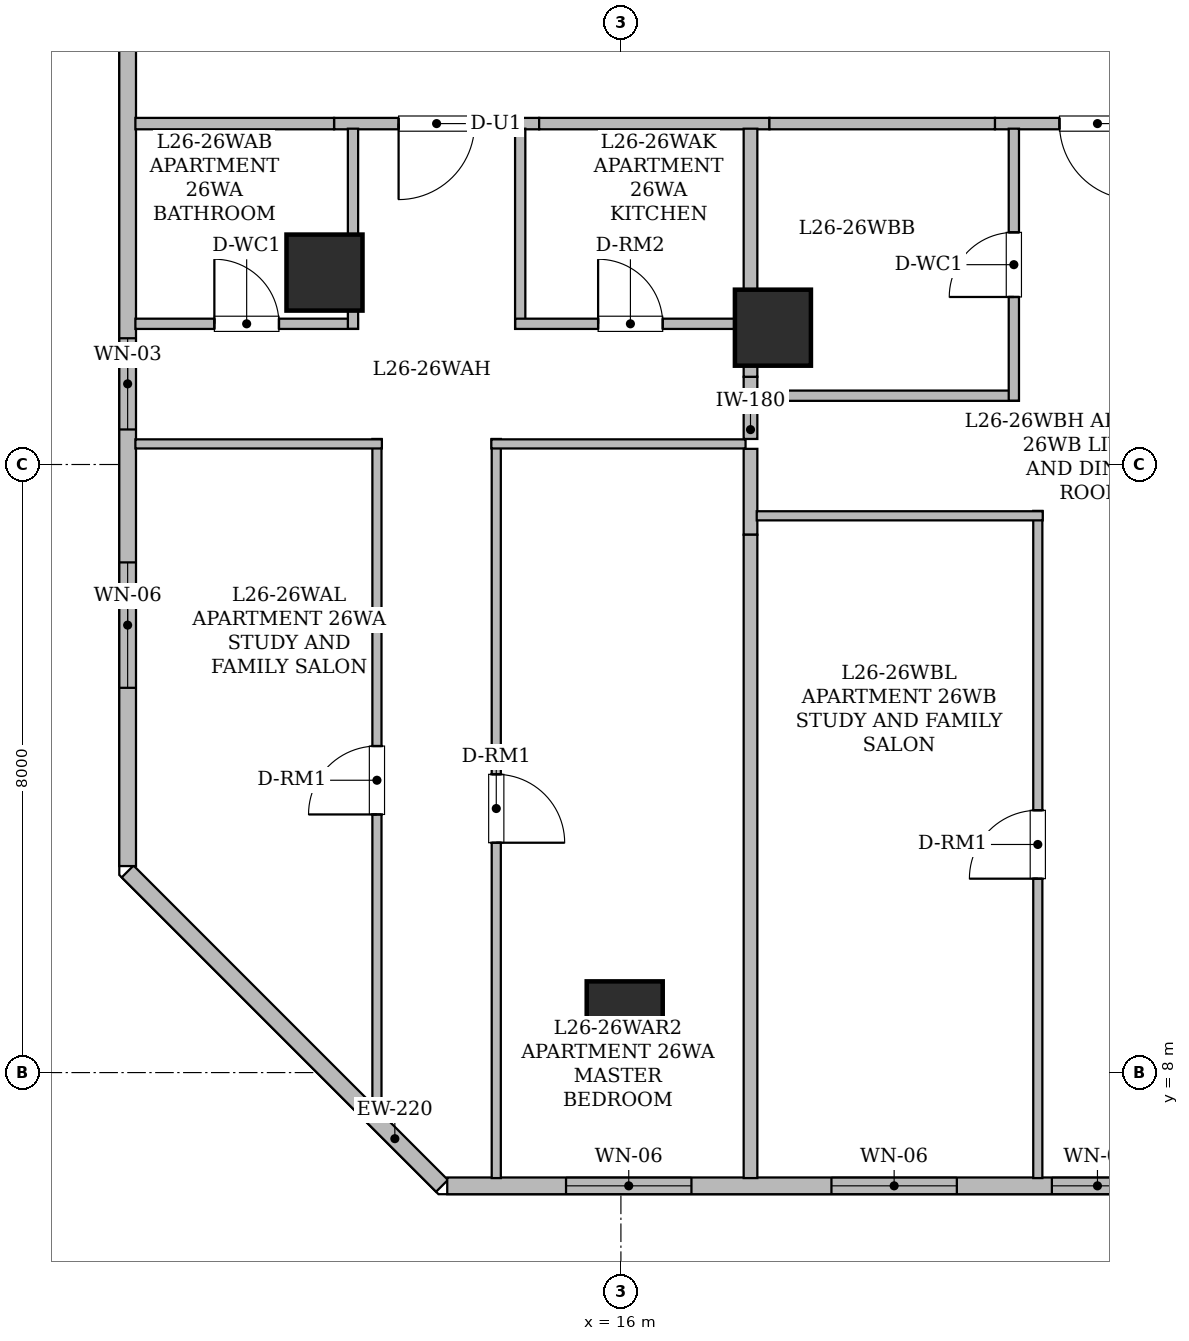
"""IFC4 building model, lengths in metres.
Left out: names, types, materials, properties, quantities, classifications, styles, units other than length and angle.
Written with IfcOpenShell. Run it as: python <this file> out.ifc"""

import sys

from ifc_helpers import new_model, si_unit, direction, frame, frame_2d, origin, origin_2d, place, context, subcontext, project, spatial, rectangle, hollow_rectangle, extrude, element, fill, save


model = new_model("IFC4")
c1 = context("Model", 3, precision=1e-05, world=origin(), true_north=direction((0.0, 1.0)))
c2 = subcontext(c1, "Body", "Model", "MODEL_VIEW")
j1 = project(units=[si_unit("LENGTHUNIT", "METRE"), si_unit("PLANEANGLEUNIT", "RADIAN")], contexts=[c1])
p1 = place(None, origin())
s1 = spatial("IfcSite", under=j1, at=p1, CompositionType="ELEMENT")
p2 = place(p1, origin())
s2 = spatial("IfcBuilding", under=s1, at=p2, CompositionType="ELEMENT")
p3 = place(p2, frame((0.0, 0.0, 105.55)))
s3 = spatial("IfcBuildingStorey", under=s2, at=p3, CompositionType="ELEMENT", Elevation=105.55)
for number, where, z_axis, x_axis in (
    (1, (16.05, 8.7, 0.0), (0.0, 0.0, 1.0), (1.0, 0.0, 0.0)),
    (2, (12.1, 18.525, 0.0), (0.0, 0.0, 1.0), (1.0, 0.0, 0.0)),
    (3, (18.0, 17.8, 0.0), (0.0, 0.0, 1.0), (1.0, 0.0, 0.0)),
):
    element("IfcColumn", number, at=place(p3, frame(where, z_axis=z_axis, x_axis=x_axis)), inside=s3, PredefinedType="COLUMN", context=c2, shape_type="SweptSolid", body=[
        extrude(hollow_rectangle(XDim=1.0, YDim=1.0, WallThickness=0.05, at=origin_2d()), origin(), (0.0, 0.0, 1.0), 3.65),
    ])
p4 = place(p3, frame((13.646, 6.51, 0.0), z_axis=(0.0, 0.0, 1.0), x_axis=(-0.707106781187, 0.707106781187, 0.0)))
e4 = element("IfcWall", 4, at=p4, inside=s3, PredefinedType="STANDARD", context=c2, shape_type="SweptSolid", body=[
    extrude(rectangle(XDim=5.849, YDim=0.22, at=frame_2d((2.925, 0.0))), origin(), (0.0, 0.0, 1.0), 3.43),
])
p5 = place(p3, frame((9.51, 10.717, 0.0), z_axis=(0.0, 0.0, 1.0), x_axis=(0.0, 1.0, 0.0)))
e5 = element("IfcWall", 5, at=p5, inside=s3, PredefinedType="STANDARD", context=c2, shape_type="SweptSolid", body=[
    extrude(rectangle(XDim=14.046, YDim=0.22, at=frame_2d((7.023, 0.0))), origin(), (0.0, 0.0, 1.0), 3.43),
])
p6 = place(p5, frame((5.744, 0.0, 0.8)))
e6 = element("IfcOpeningElement", 6, at=p6, cuts=e5, PredefinedType="OPENING", context=c2, shape_type="SweptSolid", body=[
    extrude(rectangle(XDim=1.2, YDim=1.5, at=frame_2d((0.6, 0.75))), frame((0.0, 0.12, 0.0), z_axis=(0.0, -1.0, 0.0), x_axis=(1.0, 0.0, 0.0)), (0.0, 0.0, 1.0), 0.24),
])
p7 = place(p5, frame((2.345, 0.0, 0.85)))
e7 = element("IfcOpeningElement", 7, at=p7, cuts=e5, PredefinedType="OPENING", context=c2, shape_type="SweptSolid", body=[
    extrude(rectangle(XDim=1.65, YDim=1.55, at=frame_2d((0.825, 0.775))), frame((0.0, 0.12, 0.0), z_axis=(0.0, -1.0, 0.0), x_axis=(1.0, 0.0, 0.0)), (0.0, 0.0, 1.0), 0.24),
])
p8 = place(p3, frame((52.283, 6.51, 0.0), z_axis=(0.0, 0.0, 1.0), x_axis=(-1.0, 0.0, 0.0)))
e8 = element("IfcWall", 8, at=p8, inside=s3, PredefinedType="STANDARD", context=c2, shape_type="SweptSolid", body=[
    extrude(rectangle(XDim=38.568, YDim=0.22, at=frame_2d((19.284, 0.0))), origin(), (0.0, 0.0, 1.0), 3.43),
])
p9 = place(p8, frame((21.108, 0.0, 0.85)))
e9 = element("IfcOpeningElement", 9, at=p9, cuts=e8, PredefinedType="OPENING", context=c2, shape_type="SweptSolid", body=[
    extrude(rectangle(XDim=1.65, YDim=1.55, at=frame_2d((0.825, 0.775))), frame((0.0, 0.12, 0.0), z_axis=(0.0, -1.0, 0.0), x_axis=(1.0, 0.0, 0.0)), (0.0, 0.0, 1.0), 0.24),
])
p10 = place(p8, frame((35.355, 0.0, 0.85)))
e10 = element("IfcOpeningElement", 10, at=p10, cuts=e8, PredefinedType="OPENING", context=c2, shape_type="SweptSolid", body=[
    extrude(rectangle(XDim=1.65, YDim=1.55, at=frame_2d((0.825, 0.775))), frame((0.0, 0.12, 0.0), z_axis=(0.0, -1.0, 0.0), x_axis=(1.0, 0.0, 0.0)), (0.0, 0.0, 1.0), 0.24),
])
p11 = place(p8, frame((29.413, 0.0, 0.8)))
e11 = element("IfcOpeningElement", 11, at=p11, cuts=e8, PredefinedType="OPENING", context=c2, shape_type="SweptSolid", body=[
    extrude(rectangle(XDim=1.2, YDim=1.5, at=frame_2d((0.6, 0.75))), frame((0.0, 0.12, 0.0), z_axis=(0.0, -1.0, 0.0), x_axis=(1.0, 0.0, 0.0)), (0.0, 0.0, 1.0), 0.24),
])
p12 = place(p8, frame((31.863, 0.0, 0.85)))
e12 = element("IfcOpeningElement", 12, at=p12, cuts=e8, PredefinedType="OPENING", context=c2, shape_type="SweptSolid", body=[
    extrude(rectangle(XDim=1.65, YDim=1.55, at=frame_2d((0.825, 0.775))), frame((0.0, 0.12, 0.0), z_axis=(0.0, -1.0, 0.0), x_axis=(1.0, 0.0, 0.0)), (0.0, 0.0, 1.0), 0.24),
])
p13 = place(p8, frame((26.513, 0.0, 0.85)))
e13 = element("IfcOpeningElement", 13, at=p13, cuts=e8, PredefinedType="OPENING", context=c2, shape_type="SweptSolid", body=[
    extrude(rectangle(XDim=1.65, YDim=1.55, at=frame_2d((0.825, 0.775))), frame((0.0, 0.12, 0.0), z_axis=(0.0, -1.0, 0.0), x_axis=(1.0, 0.0, 0.0)), (0.0, 0.0, 1.0), 0.24),
])
p14 = place(p8, frame((13.843, 0.0, 0.85)))
e14 = element("IfcOpeningElement", 14, at=p14, cuts=e8, PredefinedType="OPENING", context=c2, shape_type="SweptSolid", body=[
    extrude(rectangle(XDim=1.65, YDim=1.55, at=frame_2d((0.825, 0.775))), frame((0.0, 0.12, 0.0), z_axis=(0.0, -1.0, 0.0), x_axis=(1.0, 0.0, 0.0)), (0.0, 0.0, 1.0), 0.24),
])
p15 = place(p8, frame((1.479, 0.0, 0.85)))
e15 = element("IfcOpeningElement", 15, at=p15, cuts=e8, PredefinedType="OPENING", context=c2, shape_type="SweptSolid", body=[
    extrude(rectangle(XDim=1.65, YDim=1.55, at=frame_2d((0.825, 0.775))), frame((0.0, 0.12, 0.0), z_axis=(0.0, -1.0, 0.0), x_axis=(1.0, 0.0, 0.0)), (0.0, 0.0, 1.0), 0.24),
])
p16 = place(p3, frame((14.924, 20.485, 0.0), z_axis=(0.0, 0.0, 1.0), x_axis=(-1.0, 0.0, 0.0)))
e16 = element("IfcWall", 16, at=p16, inside=s3, PredefinedType="STANDARD", context=c2, shape_type="SweptSolid", body=[
    extrude(rectangle(XDim=2.698, YDim=0.15, at=frame_2d((1.349, 0.0))), origin(), (0.0, 0.0, 1.0), 3.43),
])
p17 = place(p16, frame((0.849, 0.0, 0.0)))
e17 = element("IfcOpeningElement", 17, at=p17, cuts=e16, PredefinedType="OPENING", context=c2, shape_type="SweptSolid", body=[
    extrude(rectangle(XDim=1.0, YDim=2.15, at=frame_2d((0.5, 1.075))), frame((0.0, 0.085, 0.0), z_axis=(0.0, -1.0, 0.0), x_axis=(1.0, 0.0, 0.0)), (0.0, 0.0, 1.0), 0.17),
])
p18 = place(p3, frame((12.226, 20.485, 0.0), z_axis=(0.0, 0.0, 1.0), x_axis=(-1.0, 0.0, 0.0)))
e18 = element("IfcWall", 18, at=p18, inside=s3, PredefinedType="STANDARD", context=c2, shape_type="SweptSolid", body=[
    extrude(rectangle(XDim=2.614, YDim=0.15, at=frame_2d((1.307, 0.0))), origin(), (0.0, 0.0, 1.0), 2.876),
])
p19 = place(p3, frame((17.954, 20.485, 0.0), z_axis=(0.0, 0.0, 1.0), x_axis=(-1.0, 0.0, 0.0)))
e19 = element("IfcWall", 19, at=p19, inside=s3, PredefinedType="STANDARD", context=c2, shape_type="SweptSolid", body=[
    extrude(rectangle(XDim=3.03, YDim=0.15, at=frame_2d((1.515, 0.0))), origin(), (0.0, 0.0, 1.0), 2.647),
])
p20 = place(p3, frame((23.619, 20.485, 0.0), z_axis=(0.0, 0.0, 1.0), x_axis=(-1.0, 0.0, 0.0)))
e20 = element("IfcWall", 20, at=p20, inside=s3, PredefinedType="STANDARD", context=c2, shape_type="SweptSolid", body=[
    extrude(rectangle(XDim=2.698, YDim=0.15, at=frame_2d((1.349, 0.0))), origin(), (0.0, 0.0, 1.0), 3.43),
])
p21 = place(p20, frame((0.849, 0.0, 0.0)))
e21 = element("IfcOpeningElement", 21, at=p21, cuts=e20, PredefinedType="OPENING", context=c2, shape_type="SweptSolid", body=[
    extrude(rectangle(XDim=1.0, YDim=2.15, at=frame_2d((0.5, 1.075))), frame((0.0, 0.085, 0.0), z_axis=(0.0, -1.0, 0.0), x_axis=(1.0, 0.0, 0.0)), (0.0, 0.0, 1.0), 0.17),
])
p22 = place(p3, frame((20.921, 20.485, 0.0), z_axis=(0.0, 0.0, 1.0), x_axis=(-1.0, 0.0, 0.0)))
e22 = element("IfcWall", 22, at=p22, inside=s3, PredefinedType="STANDARD", context=c2, shape_type="SweptSolid", body=[
    extrude(rectangle(XDim=2.967, YDim=0.15, at=frame_2d((1.483, 0.0))), origin(), (0.0, 0.0, 1.0), 2.647),
])
p23 = place(p3, frame((9.612, 17.851, 0.0), z_axis=(0.0, 0.0, 1.0), x_axis=(1.0, 0.0, 0.0)))
e23 = element("IfcWall", 23, at=p23, inside=s3, PredefinedType="PARTITIONING", context=c2, shape_type="SweptSolid", body=[
    extrude(rectangle(XDim=2.928, YDim=0.135, at=frame_2d((1.464, 0.0))), origin(), (0.0, 0.0, 1.0), 2.876),
])
p24 = place(p23, frame((1.039, 0.0, 0.0)))
e24 = element("IfcOpeningElement", 24, at=p24, cuts=e23, PredefinedType="OPENING", context=c2, shape_type="SweptSolid", body=[
    extrude(rectangle(XDim=0.85, YDim=2.1, at=frame_2d((0.425, 1.05))), frame((0.0, 0.077, 0.0), z_axis=(0.0, -1.0, 0.0), x_axis=(1.0, 0.0, 0.0)), (0.0, 0.0, 1.0), 0.155),
])
for number, where, z_axis, x_axis in (
    (25, (12.475, 17.786, 0.0), (0.0, 0.0, 1.0), (0.0, 1.0, 0.0)),
    (26, (14.675, 20.418, 0.0), (0.0, 0.0, 1.0), (0.0, -1.0, 0.0)),
):
    element("IfcWall", number, at=place(p3, frame(where, z_axis=z_axis, x_axis=x_axis)), inside=s3, PredefinedType="PARTITIONING", context=c2, shape_type="SweptSolid", body=[
        extrude(rectangle(XDim=2.632, YDim=0.135, at=frame_2d((1.316, 0.0))), origin(), (0.0, 0.0, 1.0), 2.647),
    ])
p25 = place(p3, frame((14.61, 17.851, 0.0), z_axis=(0.0, 0.0, 1.0), x_axis=(1.0, 0.0, 0.0)))
e27 = element("IfcWall", 27, at=p25, inside=s3, PredefinedType="PARTITIONING", context=c2, shape_type="SweptSolid", body=[
    extrude(rectangle(XDim=3.03, YDim=0.135, at=frame_2d((1.515, 0.0))), origin(), (0.0, 0.0, 1.0), 2.647),
])
p26 = place(p25, frame((1.09, 0.0, 0.0)))
e28 = element("IfcOpeningElement", 28, at=p26, cuts=e27, PredefinedType="OPENING", context=c2, shape_type="SweptSolid", body=[
    extrude(rectangle(XDim=0.85, YDim=2.1, at=frame_2d((0.425, 1.05))), frame((0.0, 0.077, 0.0), z_axis=(0.0, -1.0, 0.0), x_axis=(1.0, 0.0, 0.0)), (0.0, 0.0, 1.0), 0.155),
])
p27 = place(p3, frame((12.79, 7.357, 0.0), z_axis=(0.0, 0.0, 1.0), x_axis=(0.0, 1.0, 0.0)))
e29 = element("IfcWall", 29, at=p27, inside=s3, PredefinedType="PARTITIONING", context=c2, shape_type="SweptSolid", body=[
    extrude(rectangle(XDim=8.979, YDim=0.12, at=frame_2d((4.49, 0.0))), origin(), (0.0, 0.0, 1.0), 2.876),
])
p28 = place(p27, frame((4.039, 0.0, 0.0)))
e30 = element("IfcOpeningElement", 30, at=p28, cuts=e29, PredefinedType="OPENING", context=c2, shape_type="SweptSolid", body=[
    extrude(rectangle(XDim=0.9, YDim=2.1, at=frame_2d((0.45, 1.05))), frame((0.0, 0.07, 0.0), z_axis=(0.0, -1.0, 0.0), x_axis=(1.0, 0.0, 0.0)), (0.0, 0.0, 1.0), 0.14),
])
p29 = place(p3, frame((12.855, 16.271, 0.0), z_axis=(0.0, 0.0, 1.0), x_axis=(-1.0, 0.0, 0.0)))
e31 = element("IfcWall", 31, at=p29, inside=s3, PredefinedType="PARTITIONING", context=c2, shape_type="SweptSolid", body=[
    extrude(rectangle(XDim=3.243, YDim=0.12, at=frame_2d((1.622, 0.0))), origin(), (0.0, 0.0, 1.0), 3.43),
])
p30 = place(p3, frame((14.36, 16.336, 0.0), z_axis=(0.0, 0.0, 1.0), x_axis=(0.0, -1.0, 0.0)))
e32 = element("IfcWall", 32, at=p30, inside=s3, PredefinedType="PARTITIONING", context=c2, shape_type="SweptSolid", body=[
    extrude(rectangle(XDim=9.724, YDim=0.12, at=frame_2d((4.862, 0.0))), origin(), (0.0, 0.0, 1.0), 2.876),
])
p31 = place(p30, frame((4.412, 0.0, 0.0)))
e33 = element("IfcOpeningElement", 33, at=p31, cuts=e32, PredefinedType="OPENING", context=c2, shape_type="SweptSolid", body=[
    extrude(rectangle(XDim=0.9, YDim=2.1, at=frame_2d((0.45, 1.05))), frame((0.0, 0.07, 0.0), z_axis=(0.0, -1.0, 0.0), x_axis=(1.0, 0.0, 0.0)), (0.0, 0.0, 1.0), 0.14),
])
p32 = place(p3, frame((17.64, 16.271, 0.0), z_axis=(0.0, 0.0, 1.0), x_axis=(-1.0, 0.0, 0.0)))
e34 = element("IfcWall", 34, at=p32, inside=s3, PredefinedType="PARTITIONING", context=c2, shape_type="SweptSolid", body=[
    extrude(rectangle(XDim=3.345, YDim=0.12, at=frame_2d((1.672, 0.0))), origin(), (0.0, 0.0, 1.0), 2.647),
])
p33 = place(p3, frame((17.705, 17.154, 0.0), z_axis=(0.0, 0.0, 1.0), x_axis=(0.0, -1.0, 0.0)))
e35 = element("IfcWall", 35, at=p33, inside=s3, PredefinedType="STANDARD", context=c2, shape_type="SweptSolid", body=[
    extrude(rectangle(XDim=0.818, YDim=0.18, at=frame_2d((0.409, 0.0))), origin(), (0.0, 0.0, 1.0), 2.647),
])
p34 = place(p3, frame((17.705, 17.786, 0.0), z_axis=(0.0, 0.0, 1.0), x_axis=(0.0, -1.0, 0.0)))
e36 = element("IfcWall", 36, at=p34, inside=s3, PredefinedType="STANDARD", context=c2, shape_type="SweptSolid", body=[
    extrude(rectangle(XDim=0.632, YDim=0.18, at=frame_2d((0.316, 0.0))), origin(), (0.0, 0.0, 1.0), 2.647),
])
p35 = place(p3, frame((17.705, 20.418, 0.0), z_axis=(0.0, 0.0, 1.0), x_axis=(0.0, -1.0, 0.0)))
e37 = element("IfcWall", 37, at=p35, inside=s3, PredefinedType="STANDARD", context=c2, shape_type="SweptSolid", body=[
    extrude(rectangle(XDim=2.502, YDim=0.18, at=frame_2d((1.251, 0.0))), origin(), (0.0, 0.0, 1.0), 2.647),
])
p36 = place(p3, frame((17.705, 16.206, 0.0), z_axis=(0.0, 0.0, 1.0), x_axis=(0.0, -1.0, 0.0)))
e38 = element("IfcWall", 38, at=p36, inside=s3, PredefinedType="STANDARD", context=c2, shape_type="SweptSolid", body=[
    extrude(rectangle(XDim=1.13, YDim=0.18, at=frame_2d((0.565, 0.0))), origin(), (0.0, 0.0, 1.0), 2.647),
])
p37 = place(p3, frame((17.705, 15.076, 0.0), z_axis=(0.0, 0.0, 1.0), x_axis=(0.0, -1.0, 0.0)))
e39 = element("IfcWall", 39, at=p37, inside=s3, PredefinedType="STANDARD", context=c2, shape_type="SweptSolid", body=[
    extrude(rectangle(XDim=8.464, YDim=0.18, at=frame_2d((4.232, 0.0))), origin(), (0.0, 0.0, 1.0), 2.647),
])
p38 = place(p3, frame((17.787, 16.905, 0.0), z_axis=(0.0, 0.0, 1.0), x_axis=(1.0, 0.0, 0.0)))
e40 = element("IfcWall", 40, at=p38, inside=s3, PredefinedType="PARTITIONING", context=c2, shape_type="SweptSolid", body=[
    extrude(rectangle(XDim=3.448, YDim=0.135, at=frame_2d((1.724, 0.0))), origin(), (0.0, 0.0, 1.0), 2.647),
])
p39 = place(p3, frame((21.17, 16.84, 0.0), z_axis=(0.0, 0.0, 1.0), x_axis=(0.0, 1.0, 0.0)))
e41 = element("IfcWall", 41, at=p39, inside=s3, PredefinedType="PARTITIONING", context=c2, shape_type="SweptSolid", body=[
    extrude(rectangle(XDim=3.578, YDim=0.135, at=frame_2d((1.789, 0.0))), origin(), (0.0, 0.0, 1.0), 2.647),
])
p40 = place(p39, frame((1.364, 0.0, 0.0)))
e42 = element("IfcOpeningElement", 42, at=p40, cuts=e41, PredefinedType="OPENING", context=c2, shape_type="SweptSolid", body=[
    extrude(rectangle(XDim=0.85, YDim=2.1, at=frame_2d((0.425, 1.05))), frame((0.0, 0.077, 0.0), z_axis=(0.0, -1.0, 0.0), x_axis=(1.0, 0.0, 0.0)), (0.0, 0.0, 1.0), 0.155),
])
p41 = place(p3, frame((21.485, 6.612, 0.0), z_axis=(0.0, 0.0, 1.0), x_axis=(0.0, 1.0, 0.0)))
e43 = element("IfcWall", 43, at=p41, inside=s3, PredefinedType="PARTITIONING", context=c2, shape_type="SweptSolid", body=[
    extrude(rectangle(XDim=8.778, YDim=0.12, at=frame_2d((4.389, 0.0))), origin(), (0.0, 0.0, 1.0), 2.876),
])
p42 = place(p41, frame((3.939, 0.0, 0.0)))
e44 = element("IfcOpeningElement", 44, at=p42, cuts=e43, PredefinedType="OPENING", context=c2, shape_type="SweptSolid", body=[
    extrude(rectangle(XDim=0.9, YDim=2.1, at=frame_2d((0.45, 1.05))), frame((0.0, 0.07, 0.0), z_axis=(0.0, -1.0, 0.0), x_axis=(1.0, 0.0, 0.0)), (0.0, 0.0, 1.0), 0.14),
])
p43 = place(p3, frame((21.55, 15.325, 0.0), z_axis=(0.0, 0.0, 1.0), x_axis=(-1.0, 0.0, 0.0)))
e45 = element("IfcWall", 45, at=p43, inside=s3, PredefinedType="PARTITIONING", context=c2, shape_type="SweptSolid", body=[
    extrude(rectangle(XDim=3.763, YDim=0.12, at=frame_2d((1.881, 0.0))), origin(), (0.0, 0.0, 1.0), 3.43),
])
p44 = place(p6, origin())
e46 = element("IfcWindow", 46, at=p44, inside=s3, PartitioningType="SINGLE_PANEL", PredefinedType="WINDOW", context=c2, shape_type="SweptSolid", body=[
    extrude(rectangle(XDim=1.2, YDim=1.5, at=frame_2d((0.6, 0.75))), frame((0.0, 0.03, 0.0), z_axis=(0.0, -1.0, 0.0), x_axis=(1.0, 0.0, 0.0)), (0.0, 0.0, 1.0), 0.06),
])
fill(e6, e46)
p45 = place(p7, origin())
e47 = element("IfcWindow", 47, at=p45, inside=s3, PartitioningType="SINGLE_PANEL", PredefinedType="WINDOW", context=c2, shape_type="SweptSolid", body=[
    extrude(rectangle(XDim=1.65, YDim=1.55, at=frame_2d((0.825, 0.775))), frame((0.0, 0.03, 0.0), z_axis=(0.0, -1.0, 0.0), x_axis=(1.0, 0.0, 0.0)), (0.0, 0.0, 1.0), 0.06),
])
fill(e7, e47)
p46 = place(p10, origin())
e48 = element("IfcWindow", 48, at=p46, inside=s3, PartitioningType="SINGLE_PANEL", PredefinedType="WINDOW", context=c2, shape_type="SweptSolid", body=[
    extrude(rectangle(XDim=1.65, YDim=1.55, at=frame_2d((0.825, 0.775))), frame((0.0, 0.03, 0.0), z_axis=(0.0, -1.0, 0.0), x_axis=(1.0, 0.0, 0.0)), (0.0, 0.0, 1.0), 0.06),
])
fill(e10, e48)
p47 = place(p11, origin())
e49 = element("IfcWindow", 49, at=p47, inside=s3, PartitioningType="SINGLE_PANEL", PredefinedType="WINDOW", context=c2, shape_type="SweptSolid", body=[
    extrude(rectangle(XDim=1.2, YDim=1.5, at=frame_2d((0.6, 0.75))), frame((0.0, 0.03, 0.0), z_axis=(0.0, -1.0, 0.0), x_axis=(1.0, 0.0, 0.0)), (0.0, 0.0, 1.0), 0.06),
])
fill(e11, e49)
p48 = place(p12, origin())
e50 = element("IfcWindow", 50, at=p48, inside=s3, PartitioningType="SINGLE_PANEL", PredefinedType="WINDOW", context=c2, shape_type="SweptSolid", body=[
    extrude(rectangle(XDim=1.65, YDim=1.55, at=frame_2d((0.825, 0.775))), frame((0.0, 0.03, 0.0), z_axis=(0.0, -1.0, 0.0), x_axis=(1.0, 0.0, 0.0)), (0.0, 0.0, 1.0), 0.06),
])
fill(e12, e50)
p49 = place(p17, origin())
e51 = element("IfcDoor", 51, at=p49, inside=s3, OperationType="SINGLE_SWING_RIGHT", PredefinedType="DOOR", context=c2, shape_type="SweptSolid", body=[
    extrude(rectangle(XDim=1.0, YDim=2.15, at=frame_2d((0.5, 1.075))), frame((0.0, 0.025, 0.0), z_axis=(0.0, -1.0, 0.0), x_axis=(1.0, 0.0, 0.0)), (0.0, 0.0, 1.0), 0.05),
])
fill(e17, e51)
p50 = place(p21, origin())
e52 = element("IfcDoor", 52, at=p50, inside=s3, OperationType="SINGLE_SWING_LEFT", PredefinedType="DOOR", context=c2, shape_type="SweptSolid", body=[
    extrude(rectangle(XDim=1.0, YDim=2.15, at=frame_2d((0.5, 1.075))), frame((0.0, 0.025, 0.0), z_axis=(0.0, -1.0, 0.0), x_axis=(1.0, 0.0, 0.0)), (0.0, 0.0, 1.0), 0.05),
])
fill(e21, e52)
p51 = place(p24, origin())
e53 = element("IfcDoor", 53, at=p51, inside=s3, OperationType="SINGLE_SWING_LEFT", PredefinedType="DOOR", context=c2, shape_type="SweptSolid", body=[
    extrude(rectangle(XDim=0.85, YDim=2.1, at=frame_2d((0.425, 1.05))), frame((0.0, 0.025, 0.0), z_axis=(0.0, -1.0, 0.0), x_axis=(1.0, 0.0, 0.0)), (0.0, 0.0, 1.0), 0.05),
])
fill(e24, e53)
p52 = place(p26, origin())
e54 = element("IfcDoor", 54, at=p52, inside=s3, OperationType="SINGLE_SWING_LEFT", PredefinedType="DOOR", context=c2, shape_type="SweptSolid", body=[
    extrude(rectangle(XDim=0.85, YDim=2.1, at=frame_2d((0.425, 1.05))), frame((0.0, 0.025, 0.0), z_axis=(0.0, -1.0, 0.0), x_axis=(1.0, 0.0, 0.0)), (0.0, 0.0, 1.0), 0.05),
])
fill(e28, e54)
p53 = place(p28, origin())
e55 = element("IfcDoor", 55, at=p53, inside=s3, OperationType="SINGLE_SWING_LEFT", PredefinedType="DOOR", context=c2, shape_type="SweptSolid", body=[
    extrude(rectangle(XDim=0.9, YDim=2.1, at=frame_2d((0.45, 1.05))), frame((0.0, 0.025, 0.0), z_axis=(0.0, -1.0, 0.0), x_axis=(1.0, 0.0, 0.0)), (0.0, 0.0, 1.0), 0.05),
])
fill(e30, e55)
p54 = place(p31, origin())
e56 = element("IfcDoor", 56, at=p54, inside=s3, OperationType="SINGLE_SWING_RIGHT", PredefinedType="DOOR", context=c2, shape_type="SweptSolid", body=[
    extrude(rectangle(XDim=0.9, YDim=2.1, at=frame_2d((0.45, 1.05))), frame((0.0, 0.025, 0.0), z_axis=(0.0, -1.0, 0.0), x_axis=(1.0, 0.0, 0.0)), (0.0, 0.0, 1.0), 0.05),
])
fill(e33, e56)
p55 = place(p40, origin())
e57 = element("IfcDoor", 57, at=p55, inside=s3, OperationType="SINGLE_SWING_LEFT", PredefinedType="DOOR", context=c2, shape_type="SweptSolid", body=[
    extrude(rectangle(XDim=0.85, YDim=2.1, at=frame_2d((0.425, 1.05))), frame((0.0, 0.025, 0.0), z_axis=(0.0, -1.0, 0.0), x_axis=(1.0, 0.0, 0.0)), (0.0, 0.0, 1.0), 0.05),
])
fill(e42, e57)
p56 = place(p42, origin())
e58 = element("IfcDoor", 58, at=p56, inside=s3, OperationType="SINGLE_SWING_LEFT", PredefinedType="DOOR", context=c2, shape_type="SweptSolid", body=[
    extrude(rectangle(XDim=0.9, YDim=2.1, at=frame_2d((0.45, 1.05))), frame((0.0, 0.025, 0.0), z_axis=(0.0, -1.0, 0.0), x_axis=(1.0, 0.0, 0.0)), (0.0, 0.0, 1.0), 0.05),
])
fill(e44, e58)
save(model, sys.argv[1])
